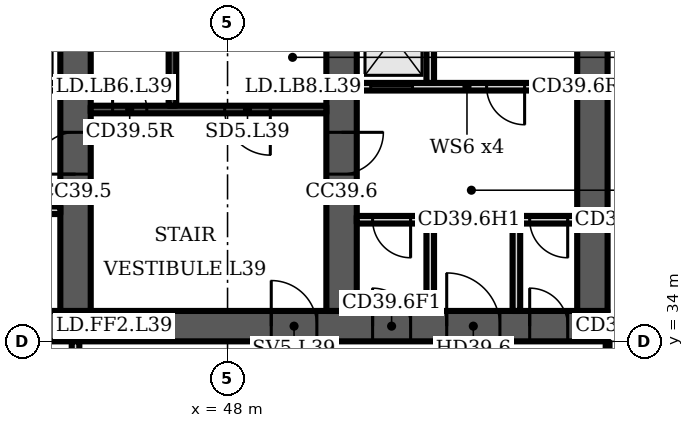
"""IFC4 building model, lengths in metres.
Left out: names, types, materials, properties, quantities, classifications, styles, units other than length and angle.
Written with IfcOpenShell. Run it as: python <this file> out.ifc"""

import sys

from ifc_helpers import new_model, si_unit, direction, frame, frame_2d, origin, place, context, subcontext, project, spatial, polyline, rectangle, outline, extrude, element, fill, save


model = new_model("IFC4")
c1 = context("Model", 3, precision=1e-05, world=origin(), true_north=direction((0.0, 1.0)))
c2 = subcontext(c1, "Body", "Model", "MODEL_VIEW")
j1 = project(units=[si_unit("LENGTHUNIT", "METRE"), si_unit("PLANEANGLEUNIT", "RADIAN")], contexts=[c1])
p1 = place(None, origin())
s1 = spatial("IfcSite", under=j1, at=p1, CompositionType="ELEMENT")
p2 = place(p1, origin())
s2 = spatial("IfcBuilding", under=s1, at=p2, CompositionType="ELEMENT")
p3 = place(p2, frame((0.0, 0.0, 162.7)))
s3 = spatial("IfcBuildingStorey", under=s2, at=p3, CompositionType="ELEMENT", Elevation=162.7)
p4 = place(p3, frame((16.0, 34.4, 0.0), z_axis=(0.0, 0.0, 1.0), x_axis=(1.0, 0.0, 0.0)))
e1 = element("IfcWall", 1, at=p4, inside=s3, PredefinedType="SHEAR", context=c2, shape_type="SweptSolid", body=[
    extrude(rectangle(XDim=42.0, YDim=0.8, at=frame_2d((21.0, 0.0))), origin(), (0.0, 0.0, 1.0), 3.6),
])
p5 = place(p4, frame((1.75, 0.0, 0.0)))
e2 = element("IfcOpeningElement", 2, at=p5, cuts=e1, PredefinedType="OPENING", context=c2, shape_type="SweptSolid", body=[
    extrude(rectangle(XDim=1.0, YDim=2.1, at=frame_2d((0.5, 1.05))), frame((0.0, 0.41, 0.0), z_axis=(0.0, -1.0, 0.0), x_axis=(1.0, 0.0, 0.0)), (0.0, 0.0, 1.0), 0.82),
])
p6 = place(p4, frame((4.65, 0.0, 0.0)))
e3 = element("IfcOpeningElement", 3, at=p6, cuts=e1, PredefinedType="OPENING", context=c2, shape_type="SweptSolid", body=[
    extrude(rectangle(XDim=1.0, YDim=2.1, at=frame_2d((0.5, 1.05))), frame((0.0, 0.41, 0.0), z_axis=(0.0, -1.0, 0.0), x_axis=(1.0, 0.0, 0.0)), (0.0, 0.0, 1.0), 0.82),
])
p7 = place(p4, frame((7.65, 0.0, 0.0)))
e4 = element("IfcOpeningElement", 4, at=p7, cuts=e1, PredefinedType="OPENING", context=c2, shape_type="SweptSolid", body=[
    extrude(rectangle(XDim=1.2, YDim=2.1, at=frame_2d((0.6, 1.05))), frame((0.0, 0.41, 0.0), z_axis=(0.0, -1.0, 0.0), x_axis=(1.0, 0.0, 0.0)), (0.0, 0.0, 1.0), 0.82),
])
p8 = place(p4, frame((14.767, 0.0, 0.0)))
e5 = element("IfcOpeningElement", 5, at=p8, cuts=e1, PredefinedType="OPENING", context=c2, shape_type="SweptSolid", body=[
    extrude(rectangle(XDim=1.1, YDim=2.1, at=frame_2d((0.55, 1.05))), frame((0.0, 0.41, 0.0), z_axis=(0.0, -1.0, 0.0), x_axis=(1.0, 0.0, 0.0)), (0.0, 0.0, 1.0), 0.82),
])
p9 = place(p4, frame((19.133, 0.0, 0.0)))
e6 = element("IfcOpeningElement", 6, at=p9, cuts=e1, PredefinedType="OPENING", context=c2, shape_type="SweptSolid", body=[
    extrude(rectangle(XDim=1.1, YDim=2.1, at=frame_2d((0.55, 1.05))), frame((0.0, 0.41, 0.0), z_axis=(0.0, -1.0, 0.0), x_axis=(1.0, 0.0, 0.0)), (0.0, 0.0, 1.0), 0.82),
])
p10 = place(p4, frame((16.8, 0.0, 0.0)))
e7 = element("IfcOpeningElement", 7, at=p10, cuts=e1, PredefinedType="OPENING", context=c2, shape_type="SweptSolid", body=[
    extrude(rectangle(XDim=1.4, YDim=2.1, at=frame_2d((0.7, 1.05))), frame((0.0, 0.41, 0.0), z_axis=(0.0, -1.0, 0.0), x_axis=(1.0, 0.0, 0.0)), (0.0, 0.0, 1.0), 0.82),
])
p11 = place(p4, frame((21.767, 0.0, 0.0)))
e8 = element("IfcOpeningElement", 8, at=p11, cuts=e1, PredefinedType="OPENING", context=c2, shape_type="SweptSolid", body=[
    extrude(rectangle(XDim=1.1, YDim=2.1, at=frame_2d((0.55, 1.05))), frame((0.0, 0.41, 0.0), z_axis=(0.0, -1.0, 0.0), x_axis=(1.0, 0.0, 0.0)), (0.0, 0.0, 1.0), 0.82),
])
p12 = place(p4, frame((23.95, 0.0, 0.0)))
e9 = element("IfcOpeningElement", 9, at=p12, cuts=e1, PredefinedType="OPENING", context=c2, shape_type="SweptSolid", body=[
    extrude(rectangle(XDim=1.1, YDim=2.1, at=frame_2d((0.55, 1.05))), frame((0.0, 0.41, 0.0), z_axis=(0.0, -1.0, 0.0), x_axis=(1.0, 0.0, 0.0)), (0.0, 0.0, 1.0), 0.82),
])
p13 = place(p4, frame((26.133, 0.0, 0.0)))
e10 = element("IfcOpeningElement", 10, at=p13, cuts=e1, PredefinedType="OPENING", context=c2, shape_type="SweptSolid", body=[
    extrude(rectangle(XDim=1.1, YDim=2.1, at=frame_2d((0.55, 1.05))), frame((0.0, 0.41, 0.0), z_axis=(0.0, -1.0, 0.0), x_axis=(1.0, 0.0, 0.0)), (0.0, 0.0, 1.0), 0.82),
])
p14 = place(p4, frame((33.15, 0.0, 0.0)))
e11 = element("IfcOpeningElement", 11, at=p14, cuts=e1, PredefinedType="OPENING", context=c2, shape_type="SweptSolid", body=[
    extrude(rectangle(XDim=1.2, YDim=2.1, at=frame_2d((0.6, 1.05))), frame((0.0, 0.41, 0.0), z_axis=(0.0, -1.0, 0.0), x_axis=(1.0, 0.0, 0.0)), (0.0, 0.0, 1.0), 0.82),
])
p15 = place(p4, frame((35.817, 0.0, 0.0)))
e12 = element("IfcOpeningElement", 12, at=p15, cuts=e1, PredefinedType="OPENING", context=c2, shape_type="SweptSolid", body=[
    extrude(rectangle(XDim=1.0, YDim=2.1, at=frame_2d((0.5, 1.05))), frame((0.0, 0.41, 0.0), z_axis=(0.0, -1.0, 0.0), x_axis=(1.0, 0.0, 0.0)), (0.0, 0.0, 1.0), 0.82),
])
p16 = place(p4, frame((39.95, 0.0, 0.0)))
e13 = element("IfcOpeningElement", 13, at=p16, cuts=e1, PredefinedType="OPENING", context=c2, shape_type="SweptSolid", body=[
    extrude(rectangle(XDim=1.0, YDim=2.1, at=frame_2d((0.5, 1.05))), frame((0.0, 0.41, 0.0), z_axis=(0.0, -1.0, 0.0), x_axis=(1.0, 0.0, 0.0)), (0.0, 0.0, 1.0), 0.82),
])
p17 = place(p4, frame((37.767, 0.0, 0.0)))
e14 = element("IfcOpeningElement", 14, at=p17, cuts=e1, PredefinedType="OPENING", context=c2, shape_type="SweptSolid", body=[
    extrude(rectangle(XDim=1.4, YDim=2.1, at=frame_2d((0.7, 1.05))), frame((0.0, 0.41, 0.0), z_axis=(0.0, -1.0, 0.0), x_axis=(1.0, 0.0, 0.0)), (0.0, 0.0, 1.0), 0.82),
])
p18 = place(p3, frame((44.0, 34.8, 0.0), z_axis=(0.0, 0.0, 1.0), x_axis=(0.0, 1.0, 0.0)))
e15 = element("IfcWall", 15, at=p18, inside=s3, PredefinedType="SHEAR", context=c2, shape_type="SweptSolid", body=[
    extrude(rectangle(XDim=14.374, YDim=0.8, at=frame_2d((7.187, 0.0))), origin(), (0.0, 0.0, 1.0), 3.6),
])
p19 = place(p18, frame((11.312, 0.0, 0.0)))
e16 = element("IfcOpeningElement", 16, at=p19, cuts=e15, PredefinedType="OPENING", context=c2, shape_type="SweptSolid", body=[
    extrude(rectangle(XDim=1.0, YDim=2.1, at=frame_2d((0.5, 1.05))), frame((0.0, 0.41, 0.0), z_axis=(0.0, -1.0, 0.0), x_axis=(1.0, 0.0, 0.0)), (0.0, 0.0, 1.0), 0.82),
])
p20 = place(p18, frame((3.6, 0.0, 0.0)))
e17 = element("IfcOpeningElement", 17, at=p20, cuts=e15, PredefinedType="OPENING", context=c2, shape_type="SweptSolid", body=[
    extrude(rectangle(XDim=1.1, YDim=2.1, at=frame_2d((0.55, 1.05))), frame((0.0, 0.41, 0.0), z_axis=(0.0, -1.0, 0.0), x_axis=(1.0, 0.0, 0.0)), (0.0, 0.0, 1.0), 0.82),
])
p21 = place(p3, frame((51.0, 34.8, 0.0), z_axis=(0.0, 0.0, 1.0), x_axis=(0.0, 1.0, 0.0)))
e18 = element("IfcWall", 18, at=p21, inside=s3, PredefinedType="SHEAR", context=c2, shape_type="SweptSolid", body=[
    extrude(rectangle(XDim=13.762, YDim=0.8, at=frame_2d((6.881, 0.0))), origin(), (0.0, 0.0, 1.0), 3.6),
])
p22 = place(p21, frame((3.6, 0.0, 0.0)))
e19 = element("IfcOpeningElement", 19, at=p22, cuts=e18, PredefinedType="OPENING", context=c2, shape_type="SweptSolid", body=[
    extrude(rectangle(XDim=1.1, YDim=2.1, at=frame_2d((0.55, 1.05))), frame((0.0, 0.41, 0.0), z_axis=(0.0, -1.0, 0.0), x_axis=(1.0, 0.0, 0.0)), (0.0, 0.0, 1.0), 0.82),
])
p23 = place(p3, frame((57.6, 34.8, 0.0), z_axis=(0.0, 0.0, 1.0), x_axis=(0.0, 1.0, 0.0)))
e20 = element("IfcWall", 20, at=p23, inside=s3, PredefinedType="SHEAR", context=c2, shape_type="SweptSolid", body=[
    extrude(rectangle(XDim=13.184, YDim=0.8, at=frame_2d((6.592, 0.0))), origin(), (0.0, 0.0, 1.0), 3.6),
])
p24 = place(p3, frame((37.4, 40.7, 0.0), z_axis=(0.0, 0.0, 1.0), x_axis=(1.0, 0.0, 0.0)))
e21 = element("IfcWall", 21, at=p24, inside=s3, PredefinedType="PARTITIONING", context=c2, shape_type="SweptSolid", body=[
    extrude(rectangle(XDim=6.2, YDim=0.2, at=frame_2d((3.1, 0.0))), origin(), (0.0, 0.0, 1.0), 3.2),
])
p25 = place(p24, frame((0.367, 0.0, 0.0)))
e22 = element("IfcOpeningElement", 22, at=p25, cuts=e21, PredefinedType="OPENING", context=c2, shape_type="SweptSolid", body=[
    extrude(rectangle(XDim=1.1, YDim=2.1, at=frame_2d((0.55, 1.05))), frame((0.0, 0.11, 0.0), z_axis=(0.0, -1.0, 0.0), x_axis=(1.0, 0.0, 0.0)), (0.0, 0.0, 1.0), 0.22),
])
p26 = place(p24, frame((2.55, 0.0, 0.0)))
e23 = element("IfcOpeningElement", 23, at=p26, cuts=e21, PredefinedType="OPENING", context=c2, shape_type="SweptSolid", body=[
    extrude(rectangle(XDim=1.1, YDim=2.1, at=frame_2d((0.55, 1.05))), frame((0.0, 0.11, 0.0), z_axis=(0.0, -1.0, 0.0), x_axis=(1.0, 0.0, 0.0)), (0.0, 0.0, 1.0), 0.22),
])
p27 = place(p24, frame((4.733, 0.0, 0.0)))
e24 = element("IfcOpeningElement", 24, at=p27, cuts=e21, PredefinedType="OPENING", context=c2, shape_type="SweptSolid", body=[
    extrude(rectangle(XDim=1.1, YDim=2.1, at=frame_2d((0.55, 1.05))), frame((0.0, 0.11, 0.0), z_axis=(0.0, -1.0, 0.0), x_axis=(1.0, 0.0, 0.0)), (0.0, 0.0, 1.0), 0.22),
])
p28 = place(p3, frame((0.0, 0.0, -0.0)))
e25 = element("IfcWall", 25, at=p28, inside=s3, PredefinedType="PARTITIONING", context=c2, shape_type="SweptSolid", body=[
    extrude(outline(polyline([(41.567, 37.1), (39.433, 37.1), (39.433, 34.8), (39.233, 34.8), (39.233, 37.65), (37.4, 37.65), (37.4, 37.85), (39.233, 37.85), (39.433, 37.85), (39.433, 37.3), (41.567, 37.3), (41.567, 37.55), (41.767, 37.55), (43.6, 37.55), (43.6, 37.35), (41.767, 37.35), (41.767, 34.8), (41.567, 34.8), (41.567, 37.1)])), origin(), (0.0, 0.0, 1.0), 3.2),
])
p29 = place(p3, frame((0.0, 0.0, -0.0)))
e26 = element("IfcWall", 26, at=p29, inside=s3, PredefinedType="PARTITIONING", context=c2, shape_type="SweptSolid", body=[
    extrude(outline(polyline([(39.433, 40.8), (39.233, 40.8), (39.233, 43.8), (37.4, 43.8), (37.4, 44.0), (43.6, 44.0), (43.6, 43.8), (41.767, 43.8), (41.767, 40.8), (41.567, 40.8), (41.567, 43.8), (39.433, 43.8), (39.433, 40.8)])), origin(), (0.0, 0.0, 1.0), 3.2),
])
p30 = place(p3, frame((44.4, 40.1, 0.0), z_axis=(0.0, 0.0, 1.0), x_axis=(1.0, 0.0, 0.0)))
e27 = element("IfcWall", 27, at=p30, inside=s3, PredefinedType="SHEAR", context=c2, shape_type="SweptSolid", body=[
    extrude(rectangle(XDim=6.2, YDim=0.2, at=frame_2d((3.1, 0.0))), origin(), (0.0, 0.0, 1.0), 3.2),
])
p31 = place(p30, frame((3.525, 0.0, 0.0)))
e28 = element("IfcOpeningElement", 28, at=p31, cuts=e27, PredefinedType="OPENING", context=c2, shape_type="SweptSolid", body=[
    extrude(rectangle(XDim=1.2, YDim=2.1, at=frame_2d((0.6, 1.05))), frame((0.0, 0.11, 0.0), z_axis=(0.0, -1.0, 0.0), x_axis=(1.0, 0.0, 0.0)), (0.0, 0.0, 1.0), 0.22),
])
p32 = place(p30, frame((0.575, 0.0, 0.0)))
e29 = element("IfcOpeningElement", 29, at=p32, cuts=e27, PredefinedType="OPENING", context=c2, shape_type="SweptSolid", body=[
    extrude(rectangle(XDim=0.9, YDim=2.1, at=frame_2d((0.45, 1.05))), frame((0.0, 0.11, 0.0), z_axis=(0.0, -1.0, 0.0), x_axis=(1.0, 0.0, 0.0)), (0.0, 0.0, 1.0), 0.22),
])
p33 = place(p3, frame((46.55, 40.2, 0.0), z_axis=(0.0, 0.0, 1.0), x_axis=(0.0, 1.0, 0.0)))
e30 = element("IfcWall", 30, at=p33, inside=s3, PredefinedType="SHEAR", context=c2, shape_type="SweptSolid", body=[
    extrude(rectangle(XDim=7.2, YDim=0.2, at=frame_2d((3.6, 0.0))), origin(), (0.0, 0.0, 1.0), 3.2),
])
p34 = place(p3, frame((51.4, 37.2, 0.0), z_axis=(0.0, 0.0, 1.0), x_axis=(1.0, 0.0, 0.0)))
e31 = element("IfcWall", 31, at=p34, inside=s3, PredefinedType="PARTITIONING", context=c2, shape_type="SweptSolid", body=[
    extrude(rectangle(XDim=1.833, YDim=0.2, at=frame_2d((0.917, 0.0))), origin(), (0.0, 0.0, 1.0), 3.2),
])
p35 = place(p34, frame((0.417, 0.0, 0.0)))
e32 = element("IfcOpeningElement", 32, at=p35, cuts=e31, PredefinedType="OPENING", context=c2, shape_type="SweptSolid", body=[
    extrude(rectangle(XDim=1.0, YDim=2.1, at=frame_2d((0.5, 1.05))), frame((0.0, 0.11, 0.0), z_axis=(0.0, -1.0, 0.0), x_axis=(1.0, 0.0, 0.0)), (0.0, 0.0, 1.0), 0.22),
])
p36 = place(p3, frame((55.7, 37.2, 0.0), z_axis=(0.0, 0.0, 1.0), x_axis=(1.0, 0.0, 0.0)))
e33 = element("IfcWall", 33, at=p36, inside=s3, PredefinedType="PARTITIONING", context=c2, shape_type="SweptSolid", body=[
    extrude(rectangle(XDim=1.5, YDim=0.2, at=frame_2d((0.75, 0.0))), origin(), (0.0, 0.0, 1.0), 3.2),
])
p37 = place(p36, frame((0.25, 0.0, 0.0)))
e34 = element("IfcOpeningElement", 34, at=p37, cuts=e33, PredefinedType="OPENING", context=c2, shape_type="SweptSolid", body=[
    extrude(rectangle(XDim=1.0, YDim=2.1, at=frame_2d((0.5, 1.05))), frame((0.0, 0.11, 0.0), z_axis=(0.0, -1.0, 0.0), x_axis=(1.0, 0.0, 0.0)), (0.0, 0.0, 1.0), 0.22),
])
p38 = place(p3, frame((51.4, 40.7, 0.0), z_axis=(0.0, 0.0, 1.0), x_axis=(1.0, 0.0, 0.0)))
e35 = element("IfcWall", 35, at=p38, inside=s3, PredefinedType="PARTITIONING", context=c2, shape_type="SweptSolid", body=[
    extrude(rectangle(XDim=5.8, YDim=0.2, at=frame_2d((2.9, 0.0))), origin(), (0.0, 0.0, 1.0), 3.2),
])
p39 = place(p38, frame((0.367, 0.0, 0.0)))
e36 = element("IfcOpeningElement", 36, at=p39, cuts=e35, PredefinedType="OPENING", context=c2, shape_type="SweptSolid", body=[
    extrude(rectangle(XDim=1.1, YDim=2.1, at=frame_2d((0.55, 1.05))), frame((0.0, 0.11, 0.0), z_axis=(0.0, -1.0, 0.0), x_axis=(1.0, 0.0, 0.0)), (0.0, 0.0, 1.0), 0.22),
])
p40 = place(p38, frame((3.417, 0.0, 0.0)))
e37 = element("IfcOpeningElement", 37, at=p40, cuts=e35, PredefinedType="OPENING", context=c2, shape_type="SweptSolid", body=[
    extrude(rectangle(XDim=1.0, YDim=2.1, at=frame_2d((0.5, 1.05))), frame((0.0, 0.11, 0.0), z_axis=(0.0, -1.0, 0.0), x_axis=(1.0, 0.0, 0.0)), (0.0, 0.0, 1.0), 0.22),
])
p41 = place(p3, frame((0.0, 0.0, -0.0)))
e38 = element("IfcWall", 38, at=p41, inside=s3, PredefinedType="PARTITIONING", context=c2, shape_type="SweptSolid", body=[
    extrude(outline(polyline([(53.233, 34.8), (53.233, 37.3), (53.433, 37.3), (53.433, 34.8), (53.233, 34.8)])), origin(), (0.0, 0.0, 1.0), 3.2),
])
p42 = place(p3, frame((0.0, 0.0, -0.0)))
e39 = element("IfcWall", 39, at=p42, inside=s3, PredefinedType="PARTITIONING", context=c2, shape_type="SweptSolid", body=[
    extrude(outline(polyline([(55.5, 34.8), (55.5, 37.3), (55.7, 37.3), (55.7, 34.8), (55.5, 34.8)])), origin(), (0.0, 0.0, 1.0), 3.2),
])
p43 = place(p3, frame((0.0, 0.0, -0.0)))
e40 = element("IfcWall", 40, at=p43, inside=s3, PredefinedType="PARTITIONING", context=c2, shape_type="SweptSolid", body=[
    extrude(outline(polyline([(53.433, 40.8), (53.433, 43.8), (53.233, 43.8), (53.233, 40.8), (53.433, 40.8)])), origin(), (0.0, 0.0, 1.0), 3.2),
])
p44 = place(p3, frame((44.0, 30.5, 0.0), z_axis=(0.0, 0.0, 1.0), x_axis=(0.0, 1.0, 0.0)))
e41 = element("IfcWall", 41, at=p44, inside=s3, PredefinedType="PARTITIONING", context=c2, shape_type="SweptSolid", body=[
    extrude(rectangle(XDim=3.5, YDim=0.2, at=frame_2d((1.75, 0.0))), origin(), (0.0, 0.0, 1.0), 3.2),
])
p45 = place(p44, frame((1.2, 0.0, 0.0)))
e42 = element("IfcOpeningElement", 42, at=p45, cuts=e41, PredefinedType="OPENING", context=c2, shape_type="SweptSolid", body=[
    extrude(rectangle(XDim=1.1, YDim=2.1, at=frame_2d((0.55, 1.05))), frame((0.0, 0.11, 0.0), z_axis=(0.0, -1.0, 0.0), x_axis=(1.0, 0.0, 0.0)), (0.0, 0.0, 1.0), 0.22),
])
p46 = place(p3, frame((58.0, 30.5, 0.0), z_axis=(0.0, 0.0, 1.0), x_axis=(0.0, 1.0, 0.0)))
e43 = element("IfcWall", 43, at=p46, inside=s3, PredefinedType="PARTITIONING", context=c2, shape_type="SweptSolid", body=[
    extrude(rectangle(XDim=3.48, YDim=0.1, at=frame_2d((1.74, 0.0))), origin(), (0.0, 0.0, 1.0), 3.2),
])
p47 = place(p31, origin())
e44 = element("IfcDoor", 44, at=p47, inside=s3, OperationType="SINGLE_SWING_RIGHT", PredefinedType="DOOR", context=c2, shape_type="SweptSolid", body=[
    extrude(rectangle(XDim=1.2, YDim=2.1, at=frame_2d((0.6, 1.05))), frame((0.0, 0.025, 0.0), z_axis=(0.0, -1.0, 0.0), x_axis=(1.0, 0.0, 0.0)), (0.0, 0.0, 1.0), 0.05),
])
fill(e28, e44)
p48 = place(p32, origin())
e45 = element("IfcDoor", 45, at=p48, inside=s3, OperationType="SINGLE_SWING_LEFT", PredefinedType="DOOR", context=c2, shape_type="SweptSolid", body=[
    extrude(rectangle(XDim=0.9, YDim=2.1, at=frame_2d((0.45, 1.05))), frame((0.0, 0.025, 0.0), z_axis=(0.0, -1.0, 0.0), x_axis=(1.0, 0.0, 0.0)), (0.0, 0.0, 1.0), 0.05),
])
fill(e29, e45)
p49 = place(p14, origin())
e46 = element("IfcDoor", 46, at=p49, inside=s3, OperationType="SINGLE_SWING_LEFT", PredefinedType="DOOR", context=c2, shape_type="SweptSolid", body=[
    extrude(rectangle(XDim=1.2, YDim=2.1, at=frame_2d((0.6, 1.05))), frame((0.0, 0.025, 0.0), z_axis=(0.0, -1.0, 0.0), x_axis=(1.0, 0.0, 0.0)), (0.0, 0.0, 1.0), 0.05),
])
fill(e11, e46)
p50 = place(p15, origin())
e47 = element("IfcDoor", 47, at=p50, inside=s3, OperationType="SINGLE_SWING_LEFT", PredefinedType="DOOR", context=c2, shape_type="SweptSolid", body=[
    extrude(rectangle(XDim=1.0, YDim=2.1, at=frame_2d((0.5, 1.05))), frame((0.0, 0.4, 0.0), z_axis=(0.0, -1.0, 0.0), x_axis=(1.0, 0.0, 0.0)), (0.0, 0.0, 1.0), 0.8),
])
fill(e12, e47)
p51 = place(p35, origin())
e48 = element("IfcDoor", 48, at=p51, inside=s3, OperationType="SINGLE_SWING_RIGHT", PredefinedType="DOOR", context=c2, shape_type="SweptSolid", body=[
    extrude(rectangle(XDim=1.0, YDim=2.1, at=frame_2d((0.5, 1.05))), frame((0.0, 0.025, 0.0), z_axis=(0.0, -1.0, 0.0), x_axis=(1.0, 0.0, 0.0)), (0.0, 0.0, 1.0), 0.05),
])
fill(e32, e48)
p52 = place(p16, origin())
e49 = element("IfcDoor", 49, at=p52, inside=s3, OperationType="SINGLE_SWING_LEFT", PredefinedType="DOOR", context=c2, shape_type="SweptSolid", body=[
    extrude(rectangle(XDim=1.0, YDim=2.1, at=frame_2d((0.5, 1.05))), frame((0.0, 0.4, 0.0), z_axis=(0.0, -1.0, 0.0), x_axis=(1.0, 0.0, 0.0)), (0.0, 0.0, 1.0), 0.8),
])
fill(e13, e49)
p53 = place(p37, origin())
e50 = element("IfcDoor", 50, at=p53, inside=s3, OperationType="SINGLE_SWING_RIGHT", PredefinedType="DOOR", context=c2, shape_type="SweptSolid", body=[
    extrude(rectangle(XDim=1.0, YDim=2.1, at=frame_2d((0.5, 1.05))), frame((0.0, 0.025, 0.0), z_axis=(0.0, -1.0, 0.0), x_axis=(1.0, 0.0, 0.0)), (0.0, 0.0, 1.0), 0.05),
])
fill(e34, e50)
p54 = place(p17, origin())
e51 = element("IfcDoor", 51, at=p54, inside=s3, OperationType="DOUBLE_DOOR_SINGLE_SWING", PredefinedType="DOOR", context=c2, shape_type="SweptSolid", body=[
    extrude(rectangle(XDim=1.4, YDim=2.1, at=frame_2d((0.7, 1.05))), frame((0.0, 0.025, 0.0), z_axis=(0.0, -1.0, 0.0), x_axis=(1.0, 0.0, 0.0)), (0.0, 0.0, 1.0), 0.05),
])
fill(e14, e51)
p55 = place(p39, origin())
e52 = element("IfcDoor", 52, at=p55, inside=s3, OperationType="DOUBLE_DOOR_SLIDING", PredefinedType="DOOR", context=c2, shape_type="SweptSolid", body=[
    extrude(rectangle(XDim=1.1, YDim=2.1, at=frame_2d((0.55, 1.05))), frame((0.0, 0.025, 0.0), z_axis=(0.0, -1.0, 0.0), x_axis=(1.0, 0.0, 0.0)), (0.0, 0.0, 1.0), 0.05),
])
fill(e36, e52)
p56 = place(p40, origin())
e53 = element("IfcDoor", 53, at=p56, inside=s3, OperationType="SINGLE_SWING_RIGHT", PredefinedType="DOOR", context=c2, shape_type="SweptSolid", body=[
    extrude(rectangle(XDim=1.0, YDim=2.1, at=frame_2d((0.5, 1.05))), frame((0.0, 0.025, 0.0), z_axis=(0.0, -1.0, 0.0), x_axis=(1.0, 0.0, 0.0)), (0.0, 0.0, 1.0), 0.05),
])
fill(e37, e53)
p57 = place(p20, origin())
e54 = element("IfcDoor", 54, at=p57, inside=s3, OperationType="SINGLE_SWING_LEFT", PredefinedType="DOOR", context=c2, shape_type="SweptSolid", body=[
    extrude(rectangle(XDim=1.1, YDim=2.1, at=frame_2d((0.55, 1.05))), frame((0.0, 0.025, 0.0), z_axis=(0.0, -1.0, 0.0), x_axis=(1.0, 0.0, 0.0)), (0.0, 0.0, 1.0), 0.05),
])
fill(e17, e54)
p58 = place(p22, origin())
e55 = element("IfcDoor", 55, at=p58, inside=s3, OperationType="SINGLE_SWING_RIGHT", PredefinedType="DOOR", context=c2, shape_type="SweptSolid", body=[
    extrude(rectangle(XDim=1.1, YDim=2.1, at=frame_2d((0.55, 1.05))), frame((0.0, 0.025, 0.0), z_axis=(0.0, -1.0, 0.0), x_axis=(1.0, 0.0, 0.0)), (0.0, 0.0, 1.0), 0.05),
])
fill(e19, e55)
save(model, sys.argv[1])
